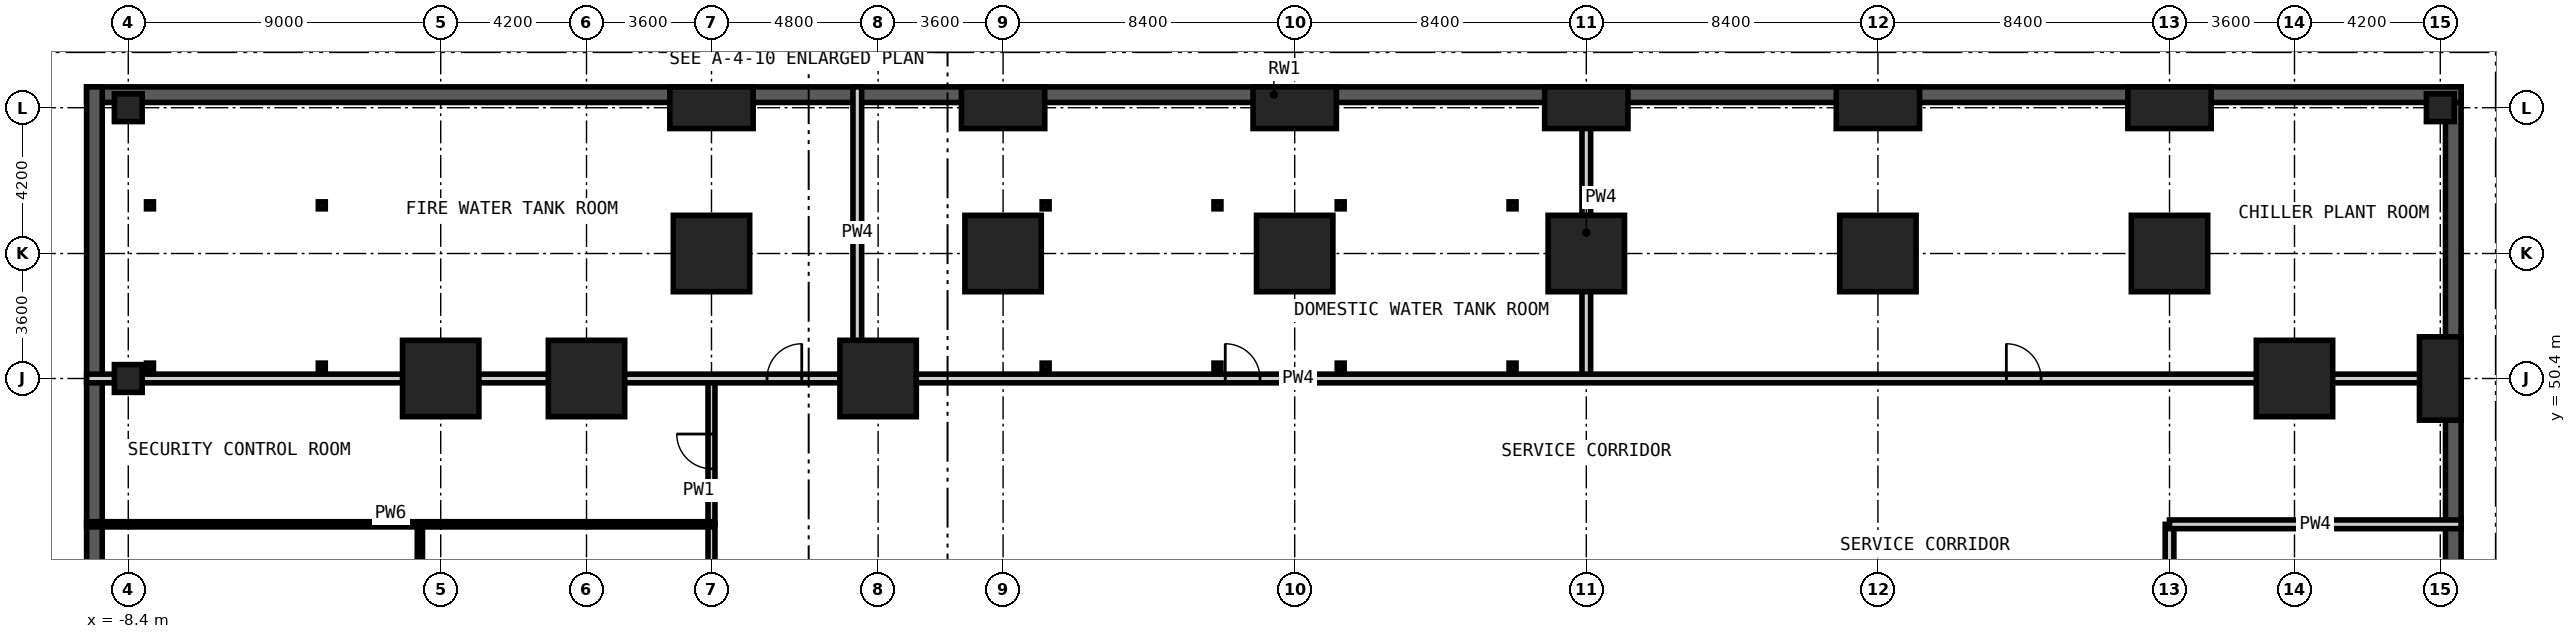
"""IFC4 building model, lengths in metres.
Left out: names, types, materials, properties, quantities, classifications, styles, units other than length and angle.
Written with IfcOpenShell. Run it as: python <this file> out.ifc"""

import sys

from ifc_helpers import new_model, si_unit, direction, frame, frame_2d, origin, origin_2d, place, context, subcontext, project, spatial, rectangle, hollow_rectangle, extrude, element, fill, save


model = new_model("IFC4")
c1 = context("Model", 3, precision=1e-05, world=origin(), true_north=direction((0.0, 1.0)))
c2 = subcontext(c1, "Body", "Model", "MODEL_VIEW")
j1 = project(units=[si_unit("LENGTHUNIT", "METRE"), si_unit("PLANEANGLEUNIT", "RADIAN")], contexts=[c1])
p1 = place(None, origin())
s1 = spatial("IfcSite", under=j1, at=p1, CompositionType="ELEMENT")
p2 = place(p1, origin())
s2 = spatial("IfcBuilding", under=s1, at=p2, CompositionType="ELEMENT")
p3 = place(p2, frame((0.0, 0.0, -5.4)))
s3 = spatial("IfcBuildingStorey", under=s2, at=p3, CompositionType="ELEMENT", Elevation=-5.4)
for number, where, z_axis, x_axis in (
    (1, (0.6, 50.4, 0.0), (0.0, 0.0, 1.0), (1.0, 0.0, 0.0)),
    (2, (4.8, 50.4, 0.0), (0.0, 0.0, 1.0), (1.0, 0.0, 0.0)),
    (3, (8.4, 54.0, 0.0), (0.0, 0.0, 1.0), (1.0, 0.0, 0.0)),
):
    element("IfcColumn", number, at=place(p3, frame(where, z_axis=z_axis, x_axis=x_axis)), inside=s3, PredefinedType="COLUMN", context=c2, shape_type="SweptSolid", body=[
        extrude(rectangle(XDim=2.2, YDim=2.2, at=origin_2d()), origin(), (0.0, 0.0, 1.0), 5.1),
    ])
p4 = place(p3, frame((8.4, 58.2, 0.0), z_axis=(0.0, 0.0, 1.0), x_axis=(1.0, 0.0, 0.0)))
e4 = element("IfcColumn", 4, at=p4, inside=s3, PredefinedType="COLUMN", context=c2, shape_type="SweptSolid", body=[
    extrude(rectangle(XDim=2.4, YDim=1.2, at=origin_2d()), origin(), (0.0, 0.0, 1.0), 5.1),
])
for number, where, z_axis, x_axis in (
    (5, (13.2, 50.4, 0.0), (0.0, 0.0, 1.0), (1.0, 0.0, 0.0)),
    (6, (16.8, 54.0, 0.0), (0.0, 0.0, 1.0), (1.0, 0.0, 0.0)),
):
    element("IfcColumn", number, at=place(p3, frame(where, z_axis=z_axis, x_axis=x_axis)), inside=s3, PredefinedType="COLUMN", context=c2, shape_type="SweptSolid", body=[
        extrude(rectangle(XDim=2.2, YDim=2.2, at=origin_2d()), origin(), (0.0, 0.0, 1.0), 5.1),
    ])
p5 = place(p3, frame((16.8, 58.2, 0.0), z_axis=(0.0, 0.0, 1.0), x_axis=(1.0, 0.0, 0.0)))
e7 = element("IfcColumn", 7, at=p5, inside=s3, PredefinedType="COLUMN", context=c2, shape_type="SweptSolid", body=[
    extrude(rectangle(XDim=2.4, YDim=1.2, at=origin_2d()), origin(), (0.0, 0.0, 1.0), 5.1),
])
p6 = place(p3, frame((25.2, 54.0, 0.0), z_axis=(0.0, 0.0, 1.0), x_axis=(1.0, 0.0, 0.0)))
e8 = element("IfcColumn", 8, at=p6, inside=s3, PredefinedType="COLUMN", context=c2, shape_type="SweptSolid", body=[
    extrude(rectangle(XDim=2.2, YDim=2.2, at=origin_2d()), origin(), (0.0, 0.0, 1.0), 5.1),
])
p7 = place(p3, frame((25.2, 58.2, 0.0), z_axis=(0.0, 0.0, 1.0), x_axis=(1.0, 0.0, 0.0)))
e9 = element("IfcColumn", 9, at=p7, inside=s3, PredefinedType="COLUMN", context=c2, shape_type="SweptSolid", body=[
    extrude(rectangle(XDim=2.4, YDim=1.2, at=origin_2d()), origin(), (0.0, 0.0, 1.0), 5.1),
])
p8 = place(p3, frame((33.6, 54.0, 0.0), z_axis=(0.0, 0.0, 1.0), x_axis=(1.0, 0.0, 0.0)))
e10 = element("IfcColumn", 10, at=p8, inside=s3, PredefinedType="COLUMN", context=c2, shape_type="SweptSolid", body=[
    extrude(rectangle(XDim=2.2, YDim=2.2, at=origin_2d()), origin(), (0.0, 0.0, 1.0), 5.1),
])
p9 = place(p3, frame((33.6, 58.2, 0.0), z_axis=(0.0, 0.0, 1.0), x_axis=(1.0, 0.0, 0.0)))
e11 = element("IfcColumn", 11, at=p9, inside=s3, PredefinedType="COLUMN", context=c2, shape_type="SweptSolid", body=[
    extrude(rectangle(XDim=2.4, YDim=1.2, at=origin_2d()), origin(), (0.0, 0.0, 1.0), 5.1),
])
p10 = place(p3, frame((42.0, 54.0, 0.0), z_axis=(0.0, 0.0, 1.0), x_axis=(1.0, 0.0, 0.0)))
e12 = element("IfcColumn", 12, at=p10, inside=s3, PredefinedType="COLUMN", context=c2, shape_type="SweptSolid", body=[
    extrude(rectangle(XDim=2.2, YDim=2.2, at=origin_2d()), origin(), (0.0, 0.0, 1.0), 5.1),
])
p11 = place(p3, frame((42.0, 58.2, 0.0), z_axis=(0.0, 0.0, 1.0), x_axis=(1.0, 0.0, 0.0)))
e13 = element("IfcColumn", 13, at=p11, inside=s3, PredefinedType="COLUMN", context=c2, shape_type="SweptSolid", body=[
    extrude(rectangle(XDim=2.4, YDim=1.2, at=origin_2d()), origin(), (0.0, 0.0, 1.0), 5.1),
])
p12 = place(p3, frame((50.4, 54.0, 0.0), z_axis=(0.0, 0.0, 1.0), x_axis=(1.0, 0.0, 0.0)))
e14 = element("IfcColumn", 14, at=p12, inside=s3, PredefinedType="COLUMN", context=c2, shape_type="SweptSolid", body=[
    extrude(rectangle(XDim=2.2, YDim=2.2, at=origin_2d()), origin(), (0.0, 0.0, 1.0), 5.1),
])
p13 = place(p3, frame((50.4, 58.2, 0.0), z_axis=(0.0, 0.0, 1.0), x_axis=(1.0, 0.0, 0.0)))
e15 = element("IfcColumn", 15, at=p13, inside=s3, PredefinedType="COLUMN", context=c2, shape_type="SweptSolid", body=[
    extrude(rectangle(XDim=2.4, YDim=1.2, at=origin_2d()), origin(), (0.0, 0.0, 1.0), 5.1),
])
p14 = place(p3, frame((54.0, 50.4, 0.0), z_axis=(0.0, 0.0, 1.0), x_axis=(1.0, 0.0, 0.0)))
e16 = element("IfcColumn", 16, at=p14, inside=s3, PredefinedType="COLUMN", context=c2, shape_type="SweptSolid", body=[
    extrude(rectangle(XDim=2.2, YDim=2.2, at=origin_2d()), origin(), (0.0, 0.0, 1.0), 5.1),
])
p15 = place(p3, frame((58.2, 50.4, 0.0), z_axis=(0.0, 0.0, 1.0), x_axis=(1.0, 0.0, 0.0)))
e17 = element("IfcColumn", 17, at=p15, inside=s3, PredefinedType="COLUMN", context=c2, shape_type="SweptSolid", body=[
    extrude(rectangle(XDim=1.2, YDim=2.4, at=origin_2d()), origin(), (0.0, 0.0, 1.0), 5.1),
])
for number, where, z_axis, x_axis in (
    (18, (-8.4, 50.4, -0.3), (0.0, 0.0, 1.0), (1.0, 0.0, 0.0)),
    (19, (-8.4, 58.2, -0.3), (0.0, 0.0, 1.0), (1.0, 0.0, 0.0)),
    (20, (58.2, 58.2, -0.3), (0.0, 0.0, 1.0), (1.0, 0.0, 0.0)),
):
    element("IfcColumn", number, at=place(p3, frame(where, z_axis=z_axis, x_axis=x_axis)), inside=s3, PredefinedType="COLUMN", context=c2, shape_type="SweptSolid", body=[
        extrude(rectangle(XDim=0.8, YDim=0.8, at=origin_2d()), origin(), (0.0, 0.0, 1.0), 5.4),
    ])
p16 = place(p3, frame((58.575, -8.4, 0.0), z_axis=(0.0, 0.0, 1.0), x_axis=(0.0, 1.0, 0.0)))
e21 = element("IfcWall", 21, at=p16, inside=s3, PredefinedType="SOLIDWALL", context=c2, shape_type="SweptSolid", body=[
    extrude(rectangle(XDim=67.2, YDim=0.45, at=frame_2d((33.6, 0.0))), origin(), (0.0, 0.0, 1.0), 5.1),
])
p17 = place(p3, frame((58.8, 58.575, 0.0), z_axis=(0.0, 0.0, 1.0), x_axis=(-1.0, 0.0, 0.0)))
e22 = element("IfcWall", 22, at=p17, inside=s3, PredefinedType="SOLIDWALL", context=c2, shape_type="SweptSolid", body=[
    extrude(rectangle(XDim=68.4, YDim=0.45, at=frame_2d((34.2, 0.0))), origin(), (0.0, 0.0, 1.0), 5.1),
])
p18 = place(p3, frame((-9.375, 58.8, 0.0), z_axis=(0.0, 0.0, 1.0), x_axis=(0.0, -1.0, 0.0)))
e23 = element("IfcWall", 23, at=p18, inside=s3, PredefinedType="SOLIDWALL", context=c2, shape_type="SweptSolid", body=[
    extrude(rectangle(XDim=67.2, YDim=0.45, at=frame_2d((33.6, 0.0))), origin(), (0.0, 0.0, 1.0), 5.1),
])
p19 = place(p3, frame((8.4, 46.2, 0.0), z_axis=(0.0, 0.0, 1.0), x_axis=(0.0, 1.0, 0.0)))
e24 = element("IfcWall", 24, at=p19, inside=s3, PredefinedType="PARTITIONING", context=c2, shape_type="SweptSolid", body=[
    extrude(rectangle(XDim=4.2, YDim=0.2, at=frame_2d((2.1, 0.0))), origin(), (0.0, 0.0, 1.0), 5.1),
])
p20 = place(p19, frame((1.6, 0.0, 0.0)))
e25 = element("IfcOpeningElement", 25, at=p20, cuts=e24, PredefinedType="OPENING", context=c2, shape_type="SweptSolid", body=[
    extrude(rectangle(XDim=1.0, YDim=2.1, at=frame_2d((0.5, 1.05))), frame((0.0, 0.11, 0.0), z_axis=(0.0, -1.0, 0.0), x_axis=(1.0, 0.0, 0.0)), (0.0, 0.0, 1.0), 0.22),
])
p21 = place(p3, frame((8.4, 46.2, 0.0), z_axis=(0.0, 0.0, 1.0), x_axis=(0.0, -1.0, 0.0)))
e26 = element("IfcWall", 26, at=p21, inside=s3, PredefinedType="PARTITIONING", context=c2, shape_type="SweptSolid", body=[
    extrude(rectangle(XDim=8.4, YDim=0.2, at=frame_2d((4.2, 0.0))), origin(), (0.0, 0.0, 1.0), 5.1),
])
p22 = place(p21, frame((3.7, 0.0, 0.0)))
e27 = element("IfcOpeningElement", 27, at=p22, cuts=e26, PredefinedType="OPENING", context=c2, shape_type="SweptSolid", body=[
    extrude(rectangle(XDim=1.0, YDim=2.1, at=frame_2d((0.5, 1.05))), frame((0.0, 0.11, 0.0), z_axis=(0.0, -1.0, 0.0), x_axis=(1.0, 0.0, 0.0)), (0.0, 0.0, 1.0), 0.22),
])
for number, where, z_axis, x_axis in (
    (28, (12.6, 50.4, 0.0), (0.0, 0.0, 1.0), (0.0, 1.0, 0.0)),
    (29, (33.6, 50.4, 0.0), (0.0, 0.0, 1.0), (0.0, 1.0, 0.0)),
):
    element("IfcWall", number, at=place(p3, frame(where, z_axis=z_axis, x_axis=x_axis)), inside=s3, PredefinedType="PARTITIONING", context=c2, shape_type="SweptSolid", body=[
        extrude(rectangle(XDim=8.4, YDim=0.25, at=frame_2d((4.2, 0.0))), origin(), (0.0, 0.0, 1.0), 5.1),
    ])
p23 = place(p3, frame((50.4, 12.6, 0.0), z_axis=(0.0, 0.0, 1.0), x_axis=(0.0, 1.0, 0.0)))
e30 = element("IfcWall", 30, at=p23, inside=s3, PredefinedType="PARTITIONING", context=c2, shape_type="SweptSolid", body=[
    extrude(rectangle(XDim=33.6, YDim=0.25, at=frame_2d((16.8, 0.0))), origin(), (0.0, 0.0, 1.0), 5.1),
])
p24 = place(p23, frame((7.9, 0.0, 0.0)))
e31 = element("IfcOpeningElement", 31, at=p24, cuts=e30, PredefinedType="OPENING", context=c2, shape_type="SweptSolid", body=[
    extrude(rectangle(XDim=1.0, YDim=2.1, at=frame_2d((0.5, 1.05))), frame((0.0, 0.135, 0.0), z_axis=(0.0, -1.0, 0.0), x_axis=(1.0, 0.0, 0.0)), (0.0, 0.0, 1.0), 0.27),
])
p25 = place(p23, frame((24.7, 0.0, 0.0)))
e32 = element("IfcOpeningElement", 32, at=p25, cuts=e30, PredefinedType="OPENING", context=c2, shape_type="SweptSolid", body=[
    extrude(rectangle(XDim=1.0, YDim=2.1, at=frame_2d((0.5, 1.05))), frame((0.0, 0.135, 0.0), z_axis=(0.0, -1.0, 0.0), x_axis=(1.0, 0.0, 0.0)), (0.0, 0.0, 1.0), 0.27),
])
p26 = place(p3, frame((50.4, 46.2, 0.0), z_axis=(0.0, 0.0, 1.0), x_axis=(1.0, 0.0, 0.0)))
e33 = element("IfcWall", 33, at=p26, inside=s3, PredefinedType="PARTITIONING", context=c2, shape_type="SweptSolid", body=[
    extrude(rectangle(XDim=8.4, YDim=0.25, at=frame_2d((4.2, 0.0))), origin(), (0.0, 0.0, 1.0), 5.1),
])
p27 = place(p3, frame((-9.6, 50.4, 0.0), z_axis=(0.0, 0.0, 1.0), x_axis=(1.0, 0.0, 0.0)))
e34 = element("IfcWall", 34, at=p27, inside=s3, PredefinedType="PARTITIONING", context=c2, shape_type="SweptSolid", body=[
    extrude(rectangle(XDim=68.4, YDim=0.25, at=frame_2d((34.2, 0.0))), origin(), (0.0, 0.0, 1.0), 5.1),
])
p28 = place(p27, frame((19.6, 0.0, 0.0)))
e35 = element("IfcOpeningElement", 35, at=p28, cuts=e34, PredefinedType="OPENING", context=c2, shape_type="SweptSolid", body=[
    extrude(rectangle(XDim=1.0, YDim=2.1, at=frame_2d((0.5, 1.05))), frame((0.0, 0.135, 0.0), z_axis=(0.0, -1.0, 0.0), x_axis=(1.0, 0.0, 0.0)), (0.0, 0.0, 1.0), 0.27),
])
p29 = place(p27, frame((32.8, 0.0, 0.0)))
e36 = element("IfcOpeningElement", 36, at=p29, cuts=e34, PredefinedType="OPENING", context=c2, shape_type="SweptSolid", body=[
    extrude(rectangle(XDim=1.0, YDim=2.1, at=frame_2d((0.5, 1.05))), frame((0.0, 0.135, 0.0), z_axis=(0.0, -1.0, 0.0), x_axis=(1.0, 0.0, 0.0)), (0.0, 0.0, 1.0), 0.27),
])
p30 = place(p27, frame((55.3, 0.0, 0.0)))
e37 = element("IfcOpeningElement", 37, at=p30, cuts=e34, PredefinedType="OPENING", context=c2, shape_type="SweptSolid", body=[
    extrude(rectangle(XDim=1.0, YDim=2.1, at=frame_2d((0.5, 1.05))), frame((0.0, 0.135, 0.0), z_axis=(0.0, -1.0, 0.0), x_axis=(1.0, 0.0, 0.0)), (0.0, 0.0, 1.0), 0.27),
])
p31 = place(p3, frame((0.0, 37.8, 0.0), z_axis=(0.0, 0.0, 1.0), x_axis=(0.0, 1.0, 0.0)))
e38 = element("IfcWall", 38, at=p31, inside=s3, PredefinedType="PARTITIONING", context=c2, shape_type="SweptSolid", body=[
    extrude(rectangle(XDim=8.4, YDim=0.15, at=frame_2d((4.2, 0.0))), origin(), (0.0, 0.0, 1.0), 5.1),
])
p32 = place(p3, frame((-9.6, 46.2, 0.0), z_axis=(0.0, 0.0, 1.0), x_axis=(1.0, 0.0, 0.0)))
e39 = element("IfcWall", 39, at=p32, inside=s3, PredefinedType="PARTITIONING", context=c2, shape_type="SweptSolid", body=[
    extrude(rectangle(XDim=18.0, YDim=0.15, at=frame_2d((9.0, 0.0))), origin(), (0.0, 0.0, 1.0), 5.1),
])
for number, where, z_axis, x_axis in (
    (40, (-7.775, 50.742, 0.0), (0.0, 0.0, 1.0), (1.0, 0.0, 0.0)),
    (41, (-2.825, 50.742, 0.0), (0.0, 0.0, 1.0), (1.0, 0.0, 0.0)),
    (42, (-7.775, 55.387, 0.0), (0.0, 0.0, 1.0), (1.0, 0.0, 0.0)),
    (43, (-2.825, 55.387, 0.0), (0.0, 0.0, 1.0), (1.0, 0.0, 0.0)),
    (44, (18.025, 50.742, 0.0), (0.0, 0.0, 1.0), (1.0, 0.0, 0.0)),
    (45, (22.975, 50.742, 0.0), (0.0, 0.0, 1.0), (1.0, 0.0, 0.0)),
    (46, (18.025, 55.387, 0.0), (0.0, 0.0, 1.0), (1.0, 0.0, 0.0)),
    (47, (22.975, 55.387, 0.0), (0.0, 0.0, 1.0), (1.0, 0.0, 0.0)),
    (48, (26.525, 50.742, 0.0), (0.0, 0.0, 1.0), (1.0, 0.0, 0.0)),
    (49, (31.475, 50.742, 0.0), (0.0, 0.0, 1.0), (1.0, 0.0, 0.0)),
    (50, (26.525, 55.387, 0.0), (0.0, 0.0, 1.0), (1.0, 0.0, 0.0)),
    (51, (31.475, 55.387, 0.0), (0.0, 0.0, 1.0), (1.0, 0.0, 0.0)),
):
    element("IfcColumn", number, at=place(p3, frame(where, z_axis=z_axis, x_axis=x_axis)), inside=s3, PredefinedType="COLUMN", context=c2, shape_type="SweptSolid", body=[
        extrude(hollow_rectangle(XDim=0.2, YDim=0.2, WallThickness=0.01, at=origin_2d()), origin(), (0.0, 0.0, 1.0), 5.1),
    ])
p33 = place(p28, origin())
e52 = element("IfcDoor", 52, at=p33, inside=s3, OperationType="SINGLE_SWING_RIGHT", PredefinedType="DOOR", context=c2, shape_type="SweptSolid", body=[
    extrude(rectangle(XDim=1.0, YDim=2.1, at=frame_2d((0.5, 1.05))), frame((0.0, 0.025, 0.0), z_axis=(0.0, -1.0, 0.0), x_axis=(1.0, 0.0, 0.0)), (0.0, 0.0, 1.0), 0.05),
])
fill(e35, e52)
p34 = place(p29, origin())
e53 = element("IfcDoor", 53, at=p34, inside=s3, OperationType="SINGLE_SWING_LEFT", PredefinedType="DOOR", context=c2, shape_type="SweptSolid", body=[
    extrude(rectangle(XDim=1.0, YDim=2.1, at=frame_2d((0.5, 1.05))), frame((0.0, 0.025, 0.0), z_axis=(0.0, -1.0, 0.0), x_axis=(1.0, 0.0, 0.0)), (0.0, 0.0, 1.0), 0.05),
])
fill(e36, e53)
p35 = place(p30, origin())
e54 = element("IfcDoor", 54, at=p35, inside=s3, OperationType="SINGLE_SWING_LEFT", PredefinedType="DOOR", context=c2, shape_type="SweptSolid", body=[
    extrude(rectangle(XDim=1.0, YDim=2.1, at=frame_2d((0.5, 1.05))), frame((0.0, 0.025, 0.0), z_axis=(0.0, -1.0, 0.0), x_axis=(1.0, 0.0, 0.0)), (0.0, 0.0, 1.0), 0.05),
])
fill(e37, e54)
p36 = place(p20, origin())
e55 = element("IfcDoor", 55, at=p36, inside=s3, OperationType="SINGLE_SWING_RIGHT", PredefinedType="DOOR", context=c2, shape_type="SweptSolid", body=[
    extrude(rectangle(XDim=1.0, YDim=2.1, at=frame_2d((0.5, 1.05))), frame((0.0, 0.025, 0.0), z_axis=(0.0, -1.0, 0.0), x_axis=(1.0, 0.0, 0.0)), (0.0, 0.0, 1.0), 0.05),
])
fill(e25, e55)
save(model, sys.argv[1])
